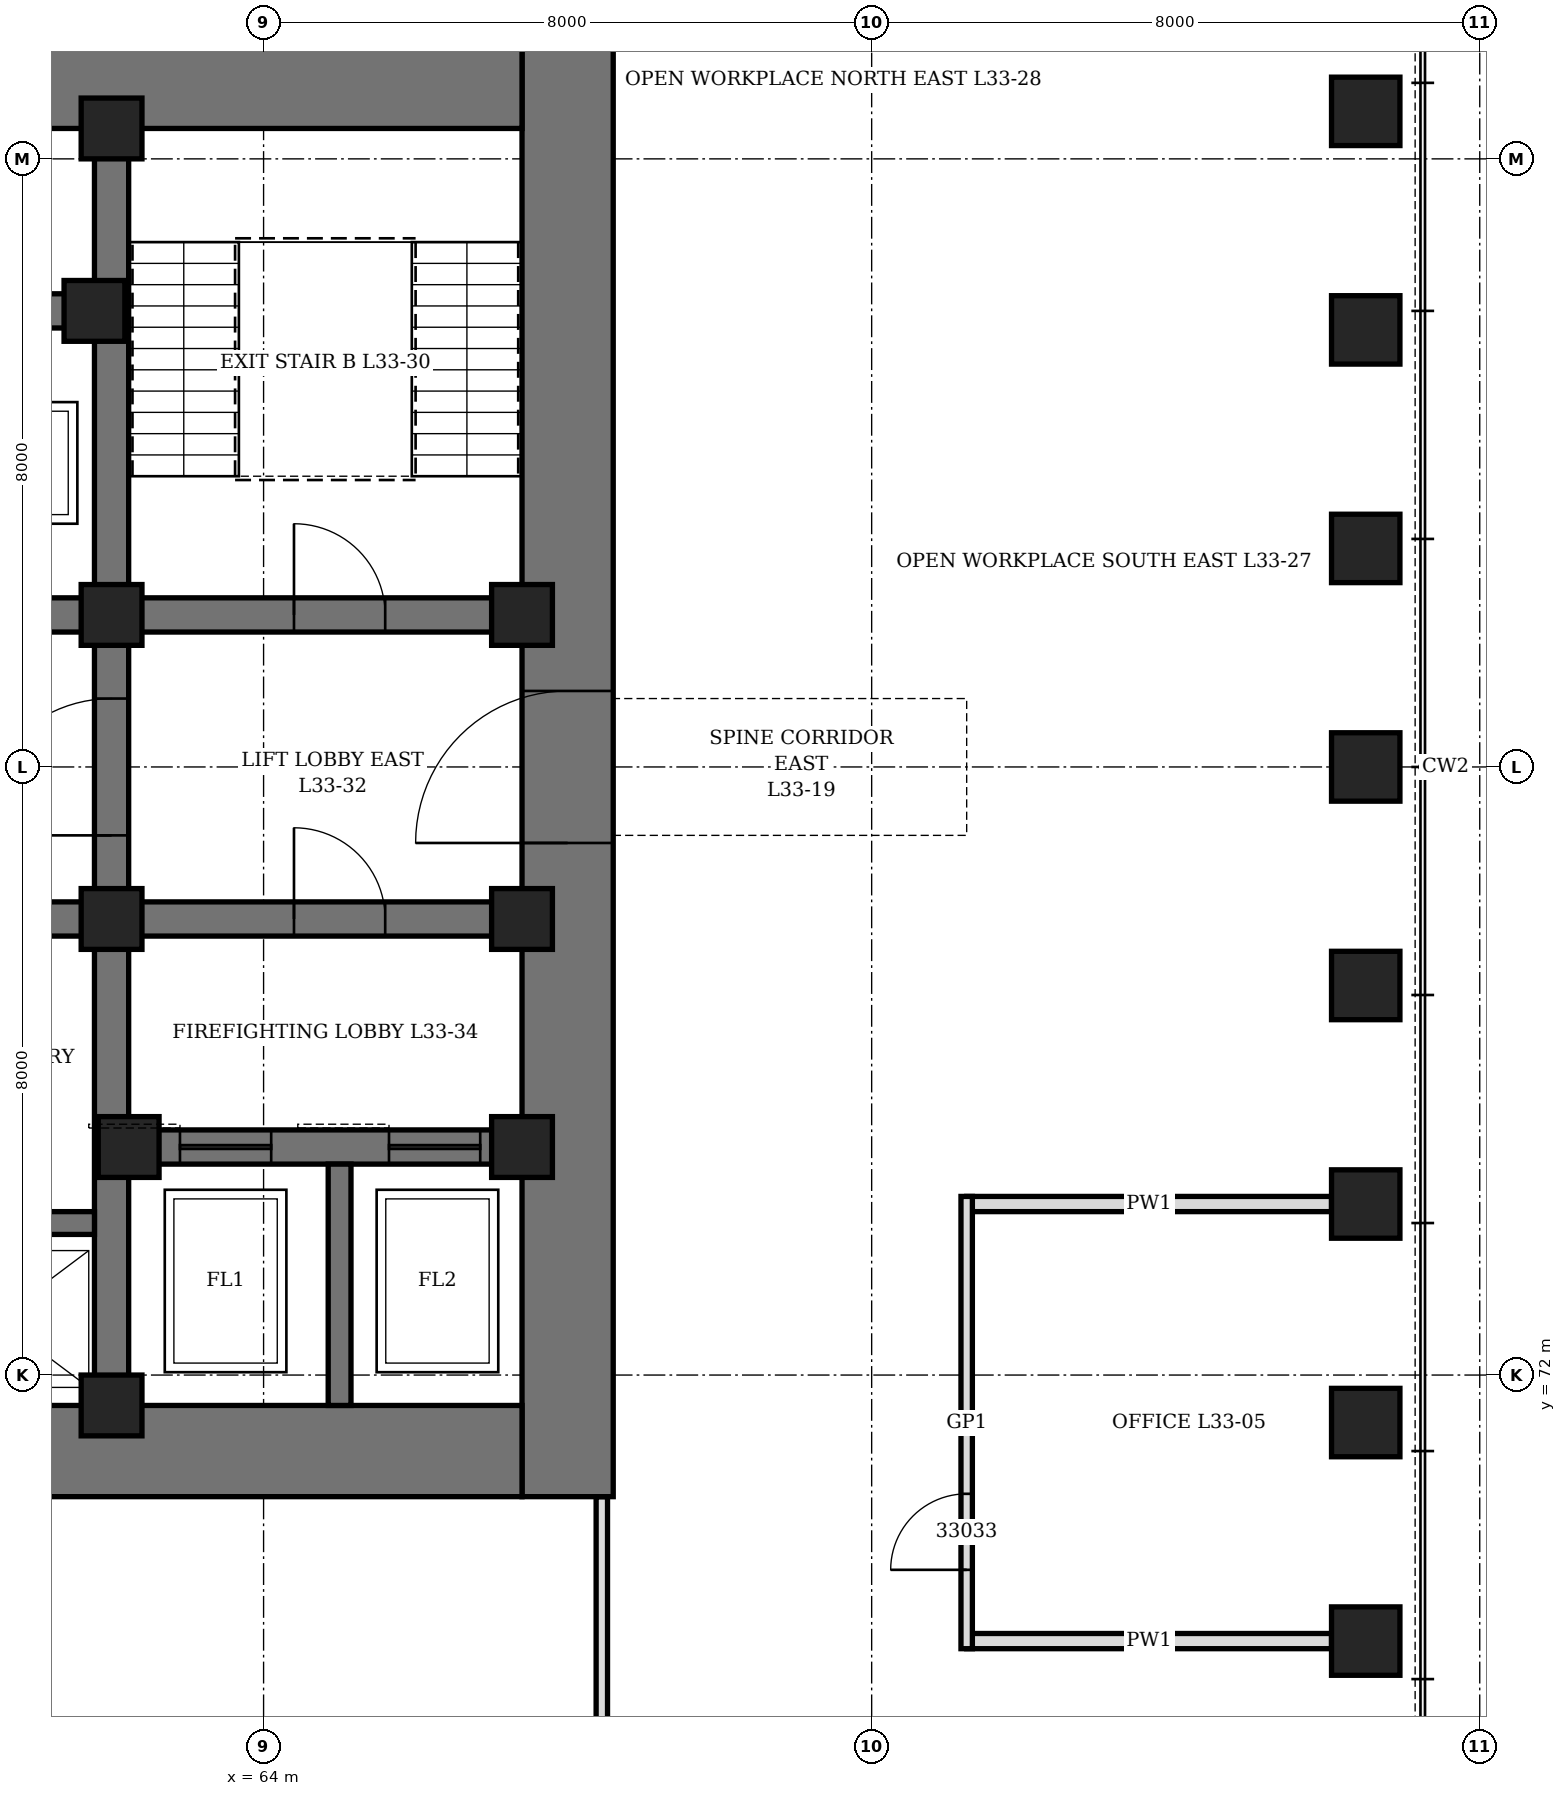
"""IFC4 building model, lengths in metres.
Left out: names, types, materials, properties, quantities, classifications, styles, units other than length and angle.
Written with IfcOpenShell. Run it as: python <this file> out.ifc"""

import sys

from ifc_helpers import new_model, si_unit, direction, frame, frame_2d, origin, origin_2d, place, context, subcontext, project, spatial, rectangle, hollow_rectangle, extrude, element, fill, save


model = new_model("IFC4")
c1 = context("Model", 3, precision=1e-05, world=origin(), true_north=direction((0.0, 1.0)))
c2 = subcontext(c1, "Body", "Model", "MODEL_VIEW")
j1 = project(units=[si_unit("LENGTHUNIT", "METRE"), si_unit("PLANEANGLEUNIT", "RADIAN")], contexts=[c1])
p1 = place(None, origin())
s1 = spatial("IfcSite", under=j1, at=p1, CompositionType="ELEMENT")
p2 = place(p1, origin())
s2 = spatial("IfcBuilding", under=s1, at=p2, CompositionType="ELEMENT")
p3 = place(p2, frame((0.0, 0.0, 150.1)))
s3 = spatial("IfcBuildingStorey", under=s2, at=p3, CompositionType="ELEMENT", Elevation=150.1)
for number, where, z_axis, x_axis in (
    (1, (78.5, 68.5, 0.0), (0.0, 0.0, 1.0), (0.0, 1.0, 0.0)),
    (2, (78.5, 71.375, 0.0), (0.0, 0.0, 1.0), (0.0, 1.0, 0.0)),
    (3, (78.5, 74.25, 0.0), (0.0, 0.0, 1.0), (0.0, 1.0, 0.0)),
    (4, (78.5, 77.125, 0.0), (0.0, 0.0, 1.0), (0.0, 1.0, 0.0)),
    (5, (78.5, 80.0, 0.0), (0.0, 0.0, 1.0), (0.0, 1.0, 0.0)),
    (6, (78.5, 82.875, 0.0), (0.0, 0.0, 1.0), (0.0, 1.0, 0.0)),
    (7, (78.5, 85.75, 0.0), (0.0, 0.0, 1.0), (0.0, 1.0, 0.0)),
    (8, (78.5, 88.625, 0.0), (0.0, 0.0, 1.0), (0.0, 1.0, 0.0)),
):
    element("IfcColumn", number, at=place(p3, frame(where, z_axis=z_axis, x_axis=x_axis)), inside=s3, PredefinedType="COLUMN", context=c2, shape_type="SweptSolid", body=[
        extrude(hollow_rectangle(XDim=0.9, YDim=0.9, WallThickness=0.12, at=origin_2d()), origin(), (0.0, 0.0, 1.0), 4.2),
    ])
p4 = place(p3, frame((68.0, 70.4, 0.0), z_axis=(0.0, 0.0, 1.0), x_axis=(0.0, 1.0, 0.0)))
e9 = element("IfcWall", 9, at=p4, inside=s3, PredefinedType="SHEAR", context=c2, shape_type="SweptSolid", body=[
    extrude(rectangle(XDim=19.2, YDim=1.2, at=frame_2d((9.6, 0.0))), origin(), (0.0, 0.0, 1.0), 4.2),
])
p5 = place(p4, frame((8.6, 0.0, 0.0)))
e10 = element("IfcOpeningElement", 10, at=p5, cuts=e9, PredefinedType="OPENING", context=c2, shape_type="SweptSolid", body=[
    extrude(rectangle(XDim=2.0, YDim=2.4, at=frame_2d((1.0, 1.2))), frame((0.0, 0.61, 0.0), z_axis=(0.0, -1.0, 0.0), x_axis=(1.0, 0.0, 0.0)), (0.0, 0.0, 1.0), 1.22),
])
p6 = place(p3, frame((44.6, 71.0, 0.0), z_axis=(0.0, 0.0, 1.0), x_axis=(1.0, 0.0, 0.0)))
e11 = element("IfcWall", 11, at=p6, inside=s3, PredefinedType="SHEAR", context=c2, shape_type="SweptSolid", body=[
    extrude(rectangle(XDim=22.8, YDim=1.2, at=frame_2d((11.4, 0.0))), origin(), (0.0, 0.0, 1.0), 4.2),
])
p7 = place(p3, frame((44.6, 89.0, 0.0), z_axis=(0.0, 0.0, 1.0), x_axis=(1.0, 0.0, 0.0)))
e12 = element("IfcWall", 12, at=p7, inside=s3, PredefinedType="SHEAR", context=c2, shape_type="SweptSolid", body=[
    extrude(rectangle(XDim=22.8, YDim=1.2, at=frame_2d((11.4, 0.0))), origin(), (0.0, 0.0, 1.0), 4.2),
])
p8 = place(p7, frame((9.275, 0.0, 0.0)))
e13 = element("IfcOpeningElement", 13, at=p8, cuts=e12, PredefinedType="OPENING", context=c2, shape_type="SweptSolid", body=[
    extrude(rectangle(XDim=1.0, YDim=2.1, at=frame_2d((0.5, 1.05))), frame((0.0, 0.61, 0.0), z_axis=(0.0, -1.0, 0.0), x_axis=(1.0, 0.0, 0.0)), (0.0, 0.0, 1.0), 1.22),
])
p9 = place(p7, frame((6.45, 0.0, 0.0)))
e14 = element("IfcOpeningElement", 14, at=p9, cuts=e12, PredefinedType="OPENING", context=c2, shape_type="SweptSolid", body=[
    extrude(rectangle(XDim=0.9, YDim=2.1, at=frame_2d((0.45, 1.05))), frame((0.0, 0.61, 0.0), z_axis=(0.0, -1.0, 0.0), x_axis=(1.0, 0.0, 0.0)), (0.0, 0.0, 1.0), 1.22),
])
p10 = place(p7, frame((12.025, 0.0, 0.0)))
e15 = element("IfcOpeningElement", 15, at=p10, cuts=e12, PredefinedType="OPENING", context=c2, shape_type="SweptSolid", body=[
    extrude(rectangle(XDim=0.9, YDim=2.1, at=frame_2d((0.45, 1.05))), frame((0.0, 0.61, 0.0), z_axis=(0.0, -1.0, 0.0), x_axis=(1.0, 0.0, 0.0)), (0.0, 0.0, 1.0), 1.22),
])
p11 = place(p7, frame((13.962, 0.0, 0.0)))
e16 = element("IfcOpeningElement", 16, at=p11, cuts=e12, PredefinedType="OPENING", context=c2, shape_type="SweptSolid", body=[
    extrude(rectangle(XDim=0.9, YDim=2.1, at=frame_2d((0.45, 1.05))), frame((0.0, 0.61, 0.0), z_axis=(0.0, -1.0, 0.0), x_axis=(1.0, 0.0, 0.0)), (0.0, 0.0, 1.0), 1.22),
])
p12 = place(p3, frame((62.0, 71.6, 0.0), z_axis=(0.0, 0.0, 1.0), x_axis=(0.0, 1.0, 0.0)))
e17 = element("IfcWall", 17, at=p12, inside=s3, PredefinedType="SHEAR", context=c2, shape_type="SweptSolid", body=[
    extrude(rectangle(XDim=16.8, YDim=0.45, at=frame_2d((8.4, 0.0))), origin(), (0.0, 0.0, 1.0), 4.2),
])
p13 = place(p12, frame((7.5, 0.0, 0.0)))
e18 = element("IfcOpeningElement", 18, at=p13, cuts=e17, PredefinedType="OPENING", context=c2, shape_type="SweptSolid", body=[
    extrude(rectangle(XDim=1.8, YDim=2.4, at=frame_2d((0.9, 1.2))), frame((0.0, 0.235, 0.0), z_axis=(0.0, -1.0, 0.0), x_axis=(1.0, 0.0, 0.0)), (0.0, 0.0, 1.0), 0.47),
])
p14 = place(p3, frame((62.225, 75.0, 0.0), z_axis=(0.0, 0.0, 1.0), x_axis=(1.0, 0.0, 0.0)))
e19 = element("IfcWall", 19, at=p14, inside=s3, PredefinedType="SHEAR", context=c2, shape_type="SweptSolid", body=[
    extrude(rectangle(XDim=5.175, YDim=0.45, at=frame_2d((2.587, 0.0))), origin(), (0.0, 0.0, 1.0), 4.2),
])
p15 = place(p14, frame((0.675, 0.0, 0.0)))
e20 = element("IfcOpeningElement", 20, at=p15, cuts=e19, PredefinedType="OPENING", context=c2, shape_type="SweptSolid", body=[
    extrude(rectangle(XDim=1.2, YDim=2.2, at=frame_2d((0.6, 1.1))), frame((0.0, 0.235, 0.0), z_axis=(0.0, -1.0, 0.0), x_axis=(1.0, 0.0, 0.0)), (0.0, 0.0, 1.0), 0.47),
])
p16 = place(p14, frame((3.425, 0.0, 0.0)))
e21 = element("IfcOpeningElement", 21, at=p16, cuts=e19, PredefinedType="OPENING", context=c2, shape_type="SweptSolid", body=[
    extrude(rectangle(XDim=1.2, YDim=2.2, at=frame_2d((0.6, 1.1))), frame((0.0, 0.235, 0.0), z_axis=(0.0, -1.0, 0.0), x_axis=(1.0, 0.0, 0.0)), (0.0, 0.0, 1.0), 0.47),
])
p17 = place(p3, frame((62.225, 78.0, 0.0), z_axis=(0.0, 0.0, 1.0), x_axis=(1.0, 0.0, 0.0)))
e22 = element("IfcWall", 22, at=p17, inside=s3, PredefinedType="SHEAR", context=c2, shape_type="SweptSolid", body=[
    extrude(rectangle(XDim=5.175, YDim=0.45, at=frame_2d((2.587, 0.0))), origin(), (0.0, 0.0, 1.0), 4.2),
])
p18 = place(p17, frame((2.175, 0.0, 0.0)))
e23 = element("IfcOpeningElement", 23, at=p18, cuts=e22, PredefinedType="OPENING", context=c2, shape_type="SweptSolid", body=[
    extrude(rectangle(XDim=1.2, YDim=2.1, at=frame_2d((0.6, 1.05))), frame((0.0, 0.235, 0.0), z_axis=(0.0, -1.0, 0.0), x_axis=(1.0, 0.0, 0.0)), (0.0, 0.0, 1.0), 0.47),
])
p19 = place(p3, frame((62.225, 82.0, 0.0), z_axis=(0.0, 0.0, 1.0), x_axis=(1.0, 0.0, 0.0)))
e24 = element("IfcWall", 24, at=p19, inside=s3, PredefinedType="SHEAR", context=c2, shape_type="SweptSolid", body=[
    extrude(rectangle(XDim=5.175, YDim=0.45, at=frame_2d((2.587, 0.0))), origin(), (0.0, 0.0, 1.0), 4.2),
])
p20 = place(p19, frame((2.175, 0.0, 0.0)))
e25 = element("IfcOpeningElement", 25, at=p20, cuts=e24, PredefinedType="OPENING", context=c2, shape_type="SweptSolid", body=[
    extrude(rectangle(XDim=1.2, YDim=2.1, at=frame_2d((0.6, 1.05))), frame((0.0, 0.235, 0.0), z_axis=(0.0, -1.0, 0.0), x_axis=(1.0, 0.0, 0.0)), (0.0, 0.0, 1.0), 0.47),
])
p21 = place(p3, frame((50.225, 78.0, 0.0), z_axis=(0.0, 0.0, 1.0), x_axis=(1.0, 0.0, 0.0)))
e26 = element("IfcWall", 26, at=p21, inside=s3, PredefinedType="SHEAR", context=c2, shape_type="SweptSolid", body=[
    extrude(rectangle(XDim=11.55, YDim=0.45, at=frame_2d((5.775, 0.0))), origin(), (0.0, 0.0, 1.0), 4.2),
])
p22 = place(p21, frame((0.825, 0.0, 0.0)))
e27 = element("IfcOpeningElement", 27, at=p22, cuts=e26, PredefinedType="OPENING", context=c2, shape_type="SweptSolid", body=[
    extrude(rectangle(XDim=0.9, YDim=2.1, at=frame_2d((0.45, 1.05))), frame((0.0, 0.235, 0.0), z_axis=(0.0, -1.0, 0.0), x_axis=(1.0, 0.0, 0.0)), (0.0, 0.0, 1.0), 0.47),
])
p23 = place(p21, frame((3.825, 0.0, 0.0)))
e28 = element("IfcOpeningElement", 28, at=p23, cuts=e26, PredefinedType="OPENING", context=c2, shape_type="SweptSolid", body=[
    extrude(rectangle(XDim=0.9, YDim=2.1, at=frame_2d((0.45, 1.05))), frame((0.0, 0.235, 0.0), z_axis=(0.0, -1.0, 0.0), x_axis=(1.0, 0.0, 0.0)), (0.0, 0.0, 1.0), 0.47),
])
p24 = place(p21, frame((6.825, 0.0, 0.0)))
e29 = element("IfcOpeningElement", 29, at=p24, cuts=e26, PredefinedType="OPENING", context=c2, shape_type="SweptSolid", body=[
    extrude(rectangle(XDim=0.9, YDim=2.1, at=frame_2d((0.45, 1.05))), frame((0.0, 0.235, 0.0), z_axis=(0.0, -1.0, 0.0), x_axis=(1.0, 0.0, 0.0)), (0.0, 0.0, 1.0), 0.47),
])
p25 = place(p21, frame((9.825, 0.0, 0.0)))
e30 = element("IfcOpeningElement", 30, at=p25, cuts=e26, PredefinedType="OPENING", context=c2, shape_type="SweptSolid", body=[
    extrude(rectangle(XDim=0.9, YDim=2.1, at=frame_2d((0.45, 1.05))), frame((0.0, 0.235, 0.0), z_axis=(0.0, -1.0, 0.0), x_axis=(1.0, 0.0, 0.0)), (0.0, 0.0, 1.0), 0.47),
])
p26 = place(p3, frame((50.225, 82.0, 0.0), z_axis=(0.0, 0.0, 1.0), x_axis=(1.0, 0.0, 0.0)))
e31 = element("IfcWall", 31, at=p26, inside=s3, PredefinedType="SHEAR", context=c2, shape_type="SweptSolid", body=[
    extrude(rectangle(XDim=11.55, YDim=0.45, at=frame_2d((5.775, 0.0))), origin(), (0.0, 0.0, 1.0), 4.2),
])
p27 = place(p26, frame((0.725, 0.0, 0.0)))
e32 = element("IfcOpeningElement", 32, at=p27, cuts=e31, PredefinedType="OPENING", context=c2, shape_type="SweptSolid", body=[
    extrude(rectangle(XDim=1.1, YDim=2.2, at=frame_2d((0.55, 1.1))), frame((0.0, 0.235, 0.0), z_axis=(0.0, -1.0, 0.0), x_axis=(1.0, 0.0, 0.0)), (0.0, 0.0, 1.0), 0.47),
])
p28 = place(p26, frame((3.725, 0.0, 0.0)))
e33 = element("IfcOpeningElement", 33, at=p28, cuts=e31, PredefinedType="OPENING", context=c2, shape_type="SweptSolid", body=[
    extrude(rectangle(XDim=1.1, YDim=2.2, at=frame_2d((0.55, 1.1))), frame((0.0, 0.235, 0.0), z_axis=(0.0, -1.0, 0.0), x_axis=(1.0, 0.0, 0.0)), (0.0, 0.0, 1.0), 0.47),
])
p29 = place(p26, frame((6.725, 0.0, 0.0)))
e34 = element("IfcOpeningElement", 34, at=p29, cuts=e31, PredefinedType="OPENING", context=c2, shape_type="SweptSolid", body=[
    extrude(rectangle(XDim=1.1, YDim=2.2, at=frame_2d((0.55, 1.1))), frame((0.0, 0.235, 0.0), z_axis=(0.0, -1.0, 0.0), x_axis=(1.0, 0.0, 0.0)), (0.0, 0.0, 1.0), 0.47),
])
p30 = place(p26, frame((9.725, 0.0, 0.0)))
e35 = element("IfcOpeningElement", 35, at=p30, cuts=e31, PredefinedType="OPENING", context=c2, shape_type="SweptSolid", body=[
    extrude(rectangle(XDim=1.1, YDim=2.2, at=frame_2d((0.55, 1.1))), frame((0.0, 0.235, 0.0), z_axis=(0.0, -1.0, 0.0), x_axis=(1.0, 0.0, 0.0)), (0.0, 0.0, 1.0), 0.47),
])
p31 = place(p3, frame((50.225, 86.0, 0.0), z_axis=(0.0, 0.0, 1.0), x_axis=(1.0, 0.0, 0.0)))
e36 = element("IfcWall", 36, at=p31, inside=s3, PredefinedType="SHEAR", context=c2, shape_type="SweptSolid", body=[
    extrude(rectangle(XDim=11.55, YDim=0.45, at=frame_2d((5.775, 0.0))), origin(), (0.0, 0.0, 1.0), 4.2),
])
p32 = place(p3, frame((50.225, 74.0, 0.0), z_axis=(0.0, 0.0, 1.0), x_axis=(1.0, 0.0, 0.0)))
e37 = element("IfcWall", 37, at=p32, inside=s3, PredefinedType="SHEAR", context=c2, shape_type="SweptSolid", body=[
    extrude(rectangle(XDim=11.55, YDim=0.3, at=frame_2d((5.775, 0.0))), origin(), (0.0, 0.0, 1.0), 4.2),
])
p33 = place(p3, frame((65.0, 71.6, 0.0), z_axis=(0.0, 0.0, 1.0), x_axis=(0.0, 1.0, 0.0)))
e38 = element("IfcWall", 38, at=p33, inside=s3, PredefinedType="SHEAR", context=c2, shape_type="SweptSolid", body=[
    extrude(rectangle(XDim=3.175, YDim=0.3, at=frame_2d((1.587, 0.0))), origin(), (0.0, 0.0, 1.0), 4.2),
])
for number, where, z_axis, x_axis in (
    (39, (61.775, 86.0, 0.0), (0.0, 0.0, 1.0), (1.0, 0.0, 0.0)),
    (40, (62.0, 71.6, 0.0), (0.0, 0.0, 1.0), (1.0, 0.0, 0.0)),
    (41, (62.0, 78.0, 0.0), (0.0, 0.0, 1.0), (1.0, 0.0, 0.0)),
    (42, (62.0, 82.0, 0.0), (0.0, 0.0, 1.0), (1.0, 0.0, 0.0)),
    (43, (62.0, 88.4, 0.0), (0.0, 0.0, 1.0), (1.0, 0.0, 0.0)),
    (44, (62.225, 75.0, 0.0), (0.0, 0.0, 1.0), (1.0, 0.0, 0.0)),
    (45, (67.4, 75.0, 0.0), (0.0, 0.0, 1.0), (1.0, 0.0, 0.0)),
    (46, (67.4, 78.0, 0.0), (0.0, 0.0, 1.0), (1.0, 0.0, 0.0)),
    (47, (67.4, 82.0, 0.0), (0.0, 0.0, 1.0), (1.0, 0.0, 0.0)),
):
    element("IfcColumn", number, at=place(p3, frame(where, z_axis=z_axis, x_axis=x_axis)), inside=s3, PredefinedType="COLUMN", context=c2, shape_type="SweptSolid", body=[
        extrude(hollow_rectangle(XDim=0.8, YDim=0.8, WallThickness=0.1, at=origin_2d()), origin(), (0.0, 0.0, 1.0), 4.2),
    ])
for number, where, z_axis, x_axis in (
    (48, (73.25, 68.5, 0.0), (0.0, 0.0, 1.0), (1.0, 0.0, 0.0)),
    (49, (73.25, 74.25, 0.0), (0.0, 0.0, 1.0), (1.0, 0.0, 0.0)),
):
    element("IfcWall", number, at=place(p3, frame(where, z_axis=z_axis, x_axis=x_axis)), inside=s3, PredefinedType="PARTITIONING", context=c2, shape_type="SweptSolid", body=[
        extrude(rectangle(XDim=4.8, YDim=0.2, at=frame_2d((2.4, 0.0))), origin(), (0.0, 0.0, 1.0), 3.428),
    ])
p34 = place(p3, frame((68.45, 56.81, 0.0), z_axis=(0.0, 0.0, 1.0), x_axis=(0.0, 1.0, 0.0)))
e50 = element("IfcWall", 50, at=p34, inside=s3, PredefinedType="PARTITIONING", context=c2, shape_type="SweptSolid", body=[
    extrude(rectangle(XDim=13.59, YDim=0.15, at=frame_2d((6.795, 0.0))), origin(), (0.0, 0.0, 1.0), 4.04),
])
p35 = place(p34, frame((6.295, 0.0, 0.0)))
e51 = element("IfcOpeningElement", 51, at=p35, cuts=e50, PredefinedType="OPENING", context=c2, shape_type="SweptSolid", body=[
    extrude(rectangle(XDim=1.0, YDim=2.4, at=frame_2d((0.5, 1.2))), frame((0.0, 0.085, 0.0), z_axis=(0.0, -1.0, 0.0), x_axis=(1.0, 0.0, 0.0)), (0.0, 0.0, 1.0), 0.17),
])
p36 = place(p3, frame((73.25, 68.4, 0.0), z_axis=(0.0, 0.0, 1.0), x_axis=(0.0, 1.0, 0.0)))
e52 = element("IfcWall", 52, at=p36, inside=s3, PredefinedType="PARTITIONING", context=c2, shape_type="SweptSolid", body=[
    extrude(rectangle(XDim=5.95, YDim=0.15, at=frame_2d((2.975, 0.0))), origin(), (0.0, 0.0, 1.0), 4.04),
])
p37 = place(p36, frame((1.038, 0.0, 0.0)))
e53 = element("IfcOpeningElement", 53, at=p37, cuts=e52, PredefinedType="OPENING", context=c2, shape_type="SweptSolid", body=[
    extrude(rectangle(XDim=1.0, YDim=2.1, at=frame_2d((0.5, 1.05))), frame((0.0, 0.085, 0.0), z_axis=(0.0, -1.0, 0.0), x_axis=(1.0, 0.0, 0.0)), (0.0, 0.0, 1.0), 0.17),
])
p38 = place(p20, origin())
e54 = element("IfcDoor", 54, at=p38, inside=s3, OperationType="SINGLE_SWING_LEFT", PredefinedType="DOOR", context=c2, shape_type="SweptSolid", body=[
    extrude(rectangle(XDim=1.2, YDim=2.1, at=frame_2d((0.6, 1.05))), frame((0.0, 0.225, 0.0), z_axis=(0.0, -1.0, 0.0), x_axis=(1.0, 0.0, 0.0)), (0.0, 0.0, 1.0), 0.449),
])
fill(e25, e54)
p39 = place(p5, origin())
e55 = element("IfcDoor", 55, at=p39, inside=s3, OperationType="DOUBLE_DOOR_SINGLE_SWING", PredefinedType="DOOR", context=c2, shape_type="SweptSolid", body=[
    extrude(rectangle(XDim=2.0, YDim=2.4, at=frame_2d((1.0, 1.2))), frame((0.0, 0.35, 0.0), z_axis=(0.0, -1.0, 0.0), x_axis=(1.0, 0.0, 0.0)), (0.0, 0.0, 1.0), 0.7),
])
fill(e10, e55)
p40 = place(p13, origin())
e56 = element("IfcDoor", 56, at=p40, inside=s3, OperationType="DOUBLE_DOOR_SINGLE_SWING", PredefinedType="DOOR", context=c2, shape_type="SweptSolid", body=[
    extrude(rectangle(XDim=1.8, YDim=2.4, at=frame_2d((0.9, 1.2))), frame((0.0, 0.225, 0.0), z_axis=(0.0, -1.0, 0.0), x_axis=(1.0, 0.0, 0.0)), (0.0, 0.0, 1.0), 0.449),
])
fill(e18, e56)
p41 = place(p18, origin())
e57 = element("IfcDoor", 57, at=p41, inside=s3, OperationType="SINGLE_SWING_RIGHT", PredefinedType="DOOR", context=c2, shape_type="SweptSolid", body=[
    extrude(rectangle(XDim=1.2, YDim=2.1, at=frame_2d((0.6, 1.05))), frame((0.0, 0.225, 0.0), z_axis=(0.0, -1.0, 0.0), x_axis=(1.0, 0.0, 0.0)), (0.0, 0.0, 1.0), 0.449),
])
fill(e23, e57)
p42 = place(p15, origin())
e58 = element("IfcDoor", 58, at=p42, inside=s3, OperationType="SLIDING_TO_LEFT", PredefinedType="DOOR", context=c2, shape_type="SweptSolid", body=[
    extrude(rectangle(XDim=1.2, YDim=2.2, at=frame_2d((0.6, 1.1))), frame((0.0, 0.225, 0.0), z_axis=(0.0, -1.0, 0.0), x_axis=(1.0, 0.0, 0.0)), (0.0, 0.0, 1.0), 0.449),
])
fill(e20, e58)
p43 = place(p16, origin())
e59 = element("IfcDoor", 59, at=p43, inside=s3, OperationType="SLIDING_TO_LEFT", PredefinedType="DOOR", context=c2, shape_type="SweptSolid", body=[
    extrude(rectangle(XDim=1.2, YDim=2.2, at=frame_2d((0.6, 1.1))), frame((0.0, 0.225, 0.0), z_axis=(0.0, -1.0, 0.0), x_axis=(1.0, 0.0, 0.0)), (0.0, 0.0, 1.0), 0.449),
])
fill(e21, e59)
p44 = place(p37, origin())
e60 = element("IfcDoor", 60, at=p44, inside=s3, OperationType="SINGLE_SWING_LEFT", PredefinedType="DOOR", context=c2, shape_type="SweptSolid", body=[
    extrude(rectangle(XDim=1.0, YDim=2.1, at=frame_2d((0.5, 1.05))), frame((0.0, 0.075, 0.0), z_axis=(0.0, -1.0, 0.0), x_axis=(1.0, 0.0, 0.0)), (0.0, 0.0, 1.0), 0.149),
])
fill(e53, e60)
save(model, sys.argv[1])
